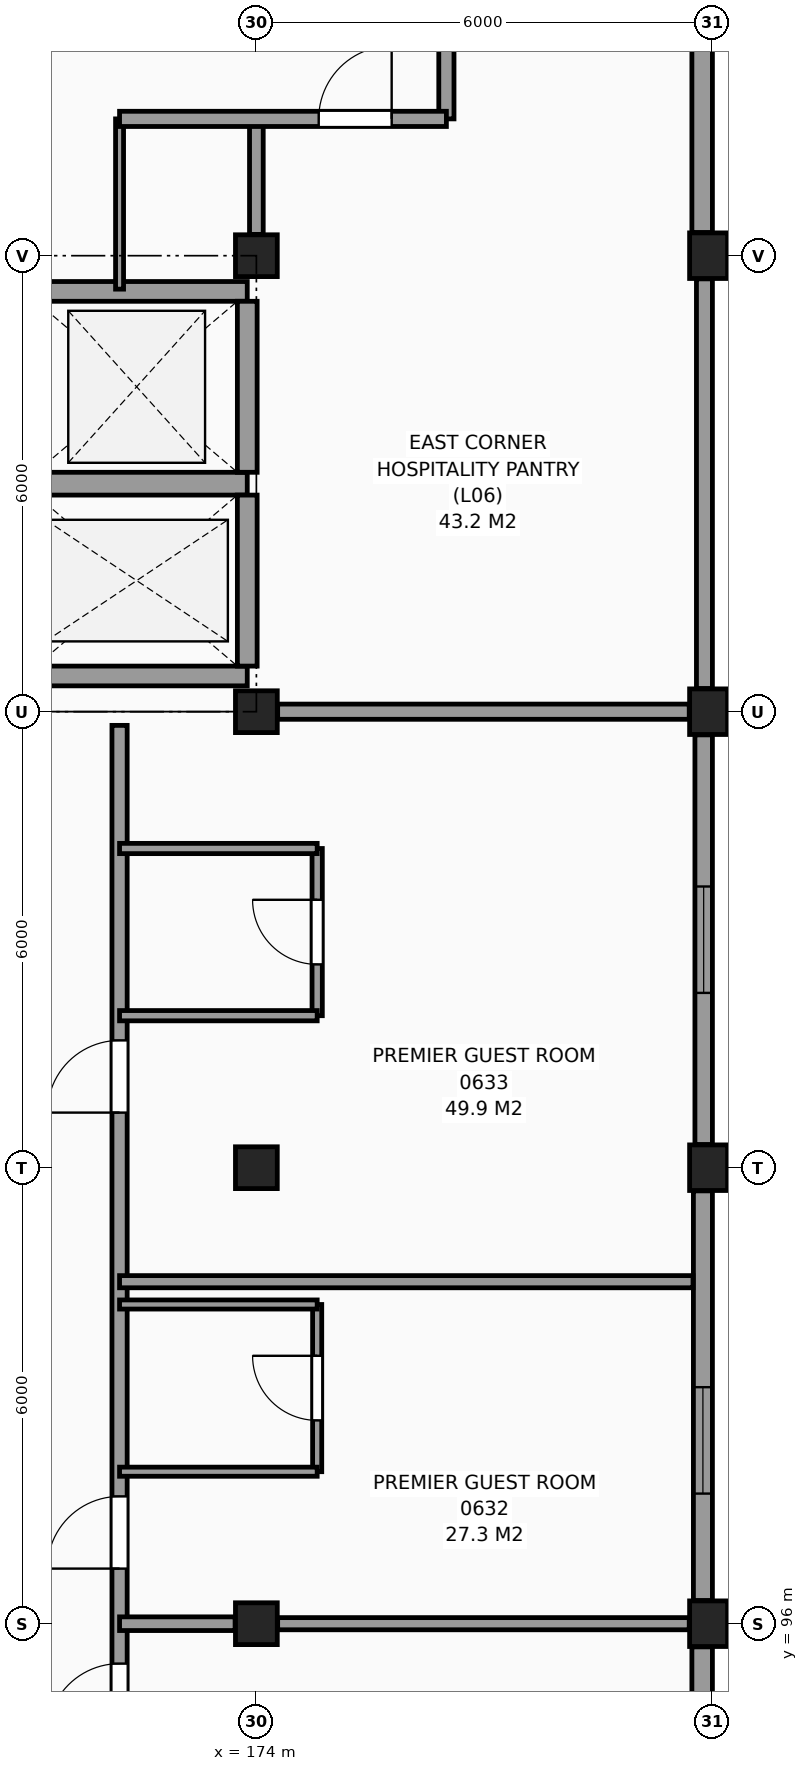
"""IFC4 building model, lengths in metres.
Left out: names, types, materials, properties, quantities, classifications, styles, units other than length and angle.
Written with IfcOpenShell. Run it as: python <this file> out.ifc"""

import sys

from ifc_helpers import new_model, si_unit, direction, frame, frame_2d, origin, origin_2d, place, context, subcontext, project, spatial, rectangle, extrude, element, fill, save


model = new_model("IFC4")
c1 = context("Model", 3, precision=1e-05, world=origin(), true_north=direction((0.0, 1.0)))
c2 = subcontext(c1, "Body", "Model", "MODEL_VIEW")
j1 = project(units=[si_unit("LENGTHUNIT", "METRE"), si_unit("PLANEANGLEUNIT", "RADIAN")], contexts=[c1])
p1 = place(None, origin())
s1 = spatial("IfcSite", under=j1, at=p1, CompositionType="ELEMENT")
p2 = place(p1, origin())
s2 = spatial("IfcBuilding", under=s1, at=p2, CompositionType="ELEMENT")
p3 = place(p2, frame((0.0, 0.0, 28.2)))
s3 = spatial("IfcBuildingStorey", under=s2, at=p3, CompositionType="ELEMENT", Elevation=28.2)
for number, where, z_axis, x_axis in (
    (1, (174.0, 96.0, 0.0), (0.0, 0.0, 1.0), (1.0, 0.0, 0.0)),
    (2, (174.0, 102.0, 0.0), (0.0, 0.0, 1.0), (1.0, 0.0, 0.0)),
    (3, (174.0, 108.0, 0.0), (0.0, 0.0, 1.0), (1.0, 0.0, 0.0)),
    (4, (174.0, 114.0, 0.0), (0.0, 0.0, 1.0), (1.0, 0.0, 0.0)),
):
    element("IfcColumn", number, at=place(p3, frame(where, z_axis=z_axis, x_axis=x_axis)), inside=s3, PredefinedType="COLUMN", context=c2, shape_type="SweptSolid", body=[
        extrude(rectangle(XDim=0.55, YDim=0.55, at=origin_2d()), origin(), (0.0, 0.0, 1.0), 3.3),
    ])
for number, where, z_axis, x_axis in (
    (5, (180.0, 96.0, 0.0), (0.0, 0.0, 1.0), (1.0, 0.0, 0.0)),
    (6, (180.0, 102.0, 0.0), (0.0, 0.0, 1.0), (1.0, 0.0, 0.0)),
    (7, (180.0, 108.0, 0.0), (0.0, 0.0, 1.0), (1.0, 0.0, 0.0)),
    (8, (180.0, 114.0, 0.0), (0.0, 0.0, 1.0), (1.0, 0.0, 0.0)),
):
    element("IfcColumn", number, at=place(p3, frame(where, z_axis=z_axis, x_axis=x_axis)), inside=s3, PredefinedType="COLUMN", context=c2, shape_type="SweptSolid", body=[
        extrude(rectangle(XDim=0.6, YDim=0.6, at=origin_2d()), origin(), (0.0, 0.0, 1.0), 3.3),
    ])
p4 = place(p3, frame((179.865, 90.305, 0.0), z_axis=(0.0, 0.0, 1.0), x_axis=(0.0, 1.0, 0.0)))
e9 = element("IfcWall", 9, at=p4, inside=s3, PredefinedType="SOLIDWALL", context=c2, shape_type="SweptSolid", body=[
    extrude(rectangle(XDim=5.39, YDim=0.27, at=frame_2d((2.695, 0.0))), origin(), (0.0, 0.0, 1.0), 2.43),
])
p5 = place(p4, frame((2.582, 0.0, 0.8)))
e10 = element("IfcOpeningElement", 10, at=p5, cuts=e9, PredefinedType="OPENING", context=c2, shape_type="SweptSolid", body=[
    extrude(rectangle(XDim=1.4, YDim=1.4, at=frame_2d((0.7, 0.7))), frame((0.0, 0.145, 0.0), z_axis=(0.0, -1.0, 0.0), x_axis=(1.0, 0.0, 0.0)), (0.0, 0.0, 1.0), 0.29),
])
p6 = place(p3, frame((179.875, 96.305, 0.0), z_axis=(0.0, 0.0, 1.0), x_axis=(0.0, 1.0, 0.0)))
e11 = element("IfcWall", 11, at=p6, inside=s3, PredefinedType="SOLIDWALL", context=c2, shape_type="SweptSolid", body=[
    extrude(rectangle(XDim=5.39, YDim=0.25, at=frame_2d((2.695, 0.0))), origin(), (0.0, 0.0, 1.0), 2.43),
])
p7 = place(p6, frame((1.407, 0.0, 0.8)))
e12 = element("IfcOpeningElement", 12, at=p7, cuts=e11, PredefinedType="OPENING", context=c2, shape_type="SweptSolid", body=[
    extrude(rectangle(XDim=1.4, YDim=1.4, at=frame_2d((0.7, 0.7))), frame((0.0, 0.135, 0.0), z_axis=(0.0, -1.0, 0.0), x_axis=(1.0, 0.0, 0.0)), (0.0, 0.0, 1.0), 0.27),
])
p8 = place(p3, frame((179.885, 102.305, 0.0), z_axis=(0.0, 0.0, 1.0), x_axis=(0.0, 1.0, 0.0)))
e13 = element("IfcWall", 13, at=p8, inside=s3, PredefinedType="SOLIDWALL", context=c2, shape_type="SweptSolid", body=[
    extrude(rectangle(XDim=5.39, YDim=0.23, at=frame_2d((2.695, 0.0))), origin(), (0.0, 0.0, 1.0), 2.43),
])
p9 = place(p8, frame((1.995, 0.0, 0.8)))
e14 = element("IfcOpeningElement", 14, at=p9, cuts=e13, PredefinedType="OPENING", context=c2, shape_type="SweptSolid", body=[
    extrude(rectangle(XDim=1.4, YDim=1.4, at=frame_2d((0.7, 0.7))), frame((0.0, 0.125, 0.0), z_axis=(0.0, -1.0, 0.0), x_axis=(1.0, 0.0, 0.0)), (0.0, 0.0, 1.0), 0.25),
])
p10 = place(p3, frame((179.895, 108.305, 0.0), z_axis=(0.0, 0.0, 1.0), x_axis=(0.0, 1.0, 0.0)))
e15 = element("IfcWall", 15, at=p10, inside=s3, PredefinedType="SOLIDWALL", context=c2, shape_type="SweptSolid", body=[
    extrude(rectangle(XDim=5.39, YDim=0.21, at=frame_2d((2.695, 0.0))), origin(), (0.0, 0.0, 1.0), 2.43),
])
p11 = place(p3, frame((179.865, 114.305, 0.0), z_axis=(0.0, 0.0, 1.0), x_axis=(0.0, 1.0, 0.0)))
e16 = element("IfcWall", 16, at=p11, inside=s3, PredefinedType="SOLIDWALL", context=c2, shape_type="SweptSolid", body=[
    extrude(rectangle(XDim=5.39, YDim=0.27, at=frame_2d((2.695, 0.0))), origin(), (0.0, 0.0, 1.0), 2.43),
])
p12 = place(p3, frame((170.97, 108.47, 0.0), z_axis=(0.0, 0.0, 1.0), x_axis=(1.0, 0.0, 0.0)))
e17 = element("IfcWall", 17, at=p12, inside=s3, PredefinedType="SHEAR", context=c2, shape_type="SweptSolid", body=[
    extrude(rectangle(XDim=2.91, YDim=0.26, at=frame_2d((1.455, 0.0))), origin(), (0.0, 0.0, 1.0), 3.3),
])
p13 = place(p3, frame((170.97, 111.0, 0.0), z_axis=(0.0, 0.0, 1.0), x_axis=(1.0, 0.0, 0.0)))
e18 = element("IfcWall", 18, at=p13, inside=s3, PredefinedType="SHEAR", context=c2, shape_type="SweptSolid", body=[
    extrude(rectangle(XDim=2.91, YDim=0.3, at=frame_2d((1.455, 0.0))), origin(), (0.0, 0.0, 1.0), 3.3),
])
p14 = place(p3, frame((173.88, 108.6, 0.0), z_axis=(0.0, 0.0, 1.0), x_axis=(0.0, 1.0, 0.0)))
e19 = element("IfcWall", 19, at=p14, inside=s3, PredefinedType="SHEAR", context=c2, shape_type="SweptSolid", body=[
    extrude(rectangle(XDim=2.25, YDim=0.26, at=frame_2d((1.125, 0.0))), origin(), (0.0, 0.0, 1.0), 3.3),
])
p15 = place(p3, frame((170.97, 113.53, 0.0), z_axis=(0.0, 0.0, 1.0), x_axis=(1.0, 0.0, 0.0)))
e20 = element("IfcWall", 20, at=p15, inside=s3, PredefinedType="SHEAR", context=c2, shape_type="SweptSolid", body=[
    extrude(rectangle(XDim=2.91, YDim=0.26, at=frame_2d((1.455, 0.0))), origin(), (0.0, 0.0, 1.0), 3.3),
])
p16 = place(p3, frame((173.88, 111.15, 0.0), z_axis=(0.0, 0.0, 1.0), x_axis=(0.0, 1.0, 0.0)))
e21 = element("IfcWall", 21, at=p16, inside=s3, PredefinedType="SHEAR", context=c2, shape_type="SweptSolid", body=[
    extrude(rectangle(XDim=2.25, YDim=0.26, at=frame_2d((1.125, 0.0))), origin(), (0.0, 0.0, 1.0), 3.3),
])
p17 = place(p3, frame((172.2, 42.275, 0.0), z_axis=(0.0, 0.0, 1.0), x_axis=(0.0, 1.0, 0.0)))
e22 = element("IfcWall", 22, at=p17, inside=s3, PredefinedType="PARTITIONING", context=c2, shape_type="SweptSolid", body=[
    extrude(rectangle(XDim=65.545, YDim=0.2, at=frame_2d((32.772, 0.0))), origin(), (0.0, 0.0, 1.0), 3.08),
])
p18 = place(p17, frame((0.4, 0.0, 0.0)))
e23 = element("IfcOpeningElement", 23, at=p18, cuts=e22, PredefinedType="OPENING", context=c2, shape_type="SweptSolid", body=[
    extrude(rectangle(XDim=0.95, YDim=2.1, at=frame_2d((0.475, 1.05))), frame((0.0, 0.11, 0.0), z_axis=(0.0, -1.0, 0.0), x_axis=(1.0, 0.0, 0.0)), (0.0, 0.0, 1.0), 0.22),
])
p19 = place(p17, frame((4.85, 0.0, 0.0)))
e24 = element("IfcOpeningElement", 24, at=p19, cuts=e22, PredefinedType="OPENING", context=c2, shape_type="SweptSolid", body=[
    extrude(rectangle(XDim=0.95, YDim=2.1, at=frame_2d((0.475, 1.05))), frame((0.0, 0.11, 0.0), z_axis=(0.0, -1.0, 0.0), x_axis=(1.0, 0.0, 0.0)), (0.0, 0.0, 1.0), 0.22),
])
p20 = place(p17, frame((9.35, 0.0, 0.0)))
e25 = element("IfcOpeningElement", 25, at=p20, cuts=e22, PredefinedType="OPENING", context=c2, shape_type="SweptSolid", body=[
    extrude(rectangle(XDim=0.95, YDim=2.1, at=frame_2d((0.475, 1.05))), frame((0.0, 0.11, 0.0), z_axis=(0.0, -1.0, 0.0), x_axis=(1.0, 0.0, 0.0)), (0.0, 0.0, 1.0), 0.22),
])
p21 = place(p17, frame((18.45, 0.0, 0.0)))
e26 = element("IfcOpeningElement", 26, at=p21, cuts=e22, PredefinedType="OPENING", context=c2, shape_type="SweptSolid", body=[
    extrude(rectangle(XDim=0.95, YDim=2.1, at=frame_2d((0.475, 1.05))), frame((0.0, 0.11, 0.0), z_axis=(0.0, -1.0, 0.0), x_axis=(1.0, 0.0, 0.0)), (0.0, 0.0, 1.0), 0.22),
])
p22 = place(p17, frame((22.85, 0.0, 0.0)))
e27 = element("IfcOpeningElement", 27, at=p22, cuts=e22, PredefinedType="OPENING", context=c2, shape_type="SweptSolid", body=[
    extrude(rectangle(XDim=0.95, YDim=2.1, at=frame_2d((0.475, 1.05))), frame((0.0, 0.11, 0.0), z_axis=(0.0, -1.0, 0.0), x_axis=(1.0, 0.0, 0.0)), (0.0, 0.0, 1.0), 0.22),
])
p23 = place(p17, frame((30.05, 0.0, 0.0)))
e28 = element("IfcOpeningElement", 28, at=p23, cuts=e22, PredefinedType="OPENING", context=c2, shape_type="SweptSolid", body=[
    extrude(rectangle(XDim=0.95, YDim=2.1, at=frame_2d((0.475, 1.05))), frame((0.0, 0.11, 0.0), z_axis=(0.0, -1.0, 0.0), x_axis=(1.0, 0.0, 0.0)), (0.0, 0.0, 1.0), 0.22),
])
p24 = place(p17, frame((38.3, 0.0, 0.0)))
e29 = element("IfcOpeningElement", 29, at=p24, cuts=e22, PredefinedType="OPENING", context=c2, shape_type="SweptSolid", body=[
    extrude(rectangle(XDim=0.95, YDim=2.1, at=frame_2d((0.475, 1.05))), frame((0.0, 0.11, 0.0), z_axis=(0.0, -1.0, 0.0), x_axis=(1.0, 0.0, 0.0)), (0.0, 0.0, 1.0), 0.22),
])
p25 = place(p17, frame((40.85, 0.0, 0.0)))
e30 = element("IfcOpeningElement", 30, at=p25, cuts=e22, PredefinedType="OPENING", context=c2, shape_type="SweptSolid", body=[
    extrude(rectangle(XDim=0.95, YDim=2.1, at=frame_2d((0.475, 1.05))), frame((0.0, 0.11, 0.0), z_axis=(0.0, -1.0, 0.0), x_axis=(1.0, 0.0, 0.0)), (0.0, 0.0, 1.0), 0.22),
])
p26 = place(p17, frame((48.05, 0.0, 0.0)))
e31 = element("IfcOpeningElement", 31, at=p26, cuts=e22, PredefinedType="OPENING", context=c2, shape_type="SweptSolid", body=[
    extrude(rectangle(XDim=0.95, YDim=2.1, at=frame_2d((0.475, 1.05))), frame((0.0, 0.11, 0.0), z_axis=(0.0, -1.0, 0.0), x_axis=(1.0, 0.0, 0.0)), (0.0, 0.0, 1.0), 0.22),
])
p27 = place(p17, frame((52.25, 0.0, 0.0)))
e32 = element("IfcOpeningElement", 32, at=p27, cuts=e22, PredefinedType="OPENING", context=c2, shape_type="SweptSolid", body=[
    extrude(rectangle(XDim=0.95, YDim=2.1, at=frame_2d((0.475, 1.05))), frame((0.0, 0.11, 0.0), z_axis=(0.0, -1.0, 0.0), x_axis=(1.0, 0.0, 0.0)), (0.0, 0.0, 1.0), 0.22),
])
p28 = place(p17, frame((54.45, 0.0, 0.0)))
e33 = element("IfcOpeningElement", 33, at=p28, cuts=e22, PredefinedType="OPENING", context=c2, shape_type="SweptSolid", body=[
    extrude(rectangle(XDim=0.95, YDim=2.1, at=frame_2d((0.475, 1.05))), frame((0.0, 0.11, 0.0), z_axis=(0.0, -1.0, 0.0), x_axis=(1.0, 0.0, 0.0)), (0.0, 0.0, 1.0), 0.22),
])
p29 = place(p17, frame((60.45, 0.0, 0.0)))
e34 = element("IfcOpeningElement", 34, at=p29, cuts=e22, PredefinedType="OPENING", context=c2, shape_type="SweptSolid", body=[
    extrude(rectangle(XDim=0.95, YDim=2.1, at=frame_2d((0.475, 1.05))), frame((0.0, 0.11, 0.0), z_axis=(0.0, -1.0, 0.0), x_axis=(1.0, 0.0, 0.0)), (0.0, 0.0, 1.0), 0.22),
])
p30 = place(p3, frame((172.2, 113.56, 0.0), z_axis=(0.0, 0.0, 1.0), x_axis=(0.0, 1.0, 0.0)))
e35 = element("IfcWall", 35, at=p30, inside=s3, PredefinedType="PARTITIONING", context=c2, shape_type="SweptSolid", body=[
    extrude(rectangle(XDim=2.24, YDim=0.105, at=frame_2d((1.12, 0.0))), origin(), (0.0, 0.0, 1.0), 3.08),
])
p31 = place(p3, frame((174.0, 114.28, 0.0), z_axis=(0.0, 0.0, 1.0), x_axis=(0.0, 1.0, 0.0)))
e36 = element("IfcWall", 36, at=p31, inside=s3, PredefinedType="PARTITIONING", context=c2, shape_type="SweptSolid", body=[
    extrude(rectangle(XDim=1.52, YDim=0.18, at=frame_2d((0.76, 0.0))), origin(), (0.0, 0.0, 1.0), 2.38),
])
p32 = place(p3, frame((174.8, 98.0, 0.0), z_axis=(0.0, 0.0, 1.0), x_axis=(0.0, 1.0, 0.0)))
e37 = element("IfcWall", 37, at=p32, inside=s3, PredefinedType="PARTITIONING", context=c2, shape_type="SweptSolid", body=[
    extrude(rectangle(XDim=2.2, YDim=0.12, at=frame_2d((1.1, 0.0))), origin(), (0.0, 0.0, 1.0), 3.08),
])
p33 = place(p32, frame((0.675, 0.0, 0.0)))
e38 = element("IfcOpeningElement", 38, at=p33, cuts=e37, PredefinedType="OPENING", context=c2, shape_type="SweptSolid", body=[
    extrude(rectangle(XDim=0.85, YDim=2.1, at=frame_2d((0.425, 1.05))), frame((0.0, 0.07, 0.0), z_axis=(0.0, -1.0, 0.0), x_axis=(1.0, 0.0, 0.0)), (0.0, 0.0, 1.0), 0.14),
])
p34 = place(p3, frame((174.8, 104.0, 0.0), z_axis=(0.0, 0.0, 1.0), x_axis=(0.0, 1.0, 0.0)))
e39 = element("IfcWall", 39, at=p34, inside=s3, PredefinedType="PARTITIONING", context=c2, shape_type="SweptSolid", body=[
    extrude(rectangle(XDim=2.2, YDim=0.135, at=frame_2d((1.1, 0.0))), origin(), (0.0, 0.0, 1.0), 3.08),
])
p35 = place(p34, frame((0.675, 0.0, 0.0)))
e40 = element("IfcOpeningElement", 40, at=p35, cuts=e39, PredefinedType="OPENING", context=c2, shape_type="SweptSolid", body=[
    extrude(rectangle(XDim=0.85, YDim=2.1, at=frame_2d((0.425, 1.05))), frame((0.0, 0.078, 0.0), z_axis=(0.0, -1.0, 0.0), x_axis=(1.0, 0.0, 0.0)), (0.0, 0.0, 1.0), 0.155),
])
p36 = place(p3, frame((176.5, 115.8, 0.0), z_axis=(0.0, 0.0, 1.0), x_axis=(0.0, 1.0, 0.0)))
e41 = element("IfcWall", 41, at=p36, inside=s3, PredefinedType="PARTITIONING", context=c2, shape_type="SweptSolid", body=[
    extrude(rectangle(XDim=2.4, YDim=0.2, at=frame_2d((1.2, 0.0))), origin(), (0.0, 0.0, 1.0), 3.08),
])
p37 = place(p3, frame((172.2, 96.0, 0.0), z_axis=(0.0, 0.0, 1.0), x_axis=(1.0, 0.0, 0.0)))
e42 = element("IfcWall", 42, at=p37, inside=s3, PredefinedType="PARTITIONING", context=c2, shape_type="SweptSolid", body=[
    extrude(rectangle(XDim=1.52, YDim=0.18, at=frame_2d((0.76, 0.0))), origin(), (0.0, 0.0, 1.0), 2.28),
])
p38 = place(p3, frame((174.28, 96.0, 0.0), z_axis=(0.0, 0.0, 1.0), x_axis=(1.0, 0.0, 0.0)))
e43 = element("IfcWall", 43, at=p38, inside=s3, PredefinedType="PARTITIONING", context=c2, shape_type="SweptSolid", body=[
    extrude(rectangle(XDim=5.415, YDim=0.16, at=frame_2d((2.708, 0.0))), origin(), (0.0, 0.0, 1.0), 2.38),
])
for number, where, z_axis, x_axis in (
    (44, (172.2, 98.0, 0.0), (0.0, 0.0, 1.0), (1.0, 0.0, 0.0)),
    (45, (172.2, 100.2, 0.0), (0.0, 0.0, 1.0), (1.0, 0.0, 0.0)),
):
    element("IfcWall", number, at=place(p3, frame(where, z_axis=z_axis, x_axis=x_axis)), inside=s3, PredefinedType="PARTITIONING", context=c2, shape_type="SweptSolid", body=[
        extrude(rectangle(XDim=2.6, YDim=0.12, at=frame_2d((1.3, 0.0))), origin(), (0.0, 0.0, 1.0), 3.08),
    ])
p39 = place(p3, frame((172.2, 100.5, 0.0), z_axis=(0.0, 0.0, 1.0), x_axis=(1.0, 0.0, 0.0)))
e46 = element("IfcWall", 46, at=p39, inside=s3, PredefinedType="PARTITIONING", context=c2, shape_type="SweptSolid", body=[
    extrude(rectangle(XDim=7.545, YDim=0.16, at=frame_2d((3.772, 0.0))), origin(), (0.0, 0.0, 1.0), 3.08),
])
for number, where, z_axis, x_axis in (
    (47, (172.2, 104.0, 0.0), (0.0, 0.0, 1.0), (1.0, 0.0, 0.0)),
    (48, (172.2, 106.2, 0.0), (0.0, 0.0, 1.0), (1.0, 0.0, 0.0)),
):
    element("IfcWall", number, at=place(p3, frame(where, z_axis=z_axis, x_axis=x_axis)), inside=s3, PredefinedType="PARTITIONING", context=c2, shape_type="SweptSolid", body=[
        extrude(rectangle(XDim=2.6, YDim=0.135, at=frame_2d((1.3, 0.0))), origin(), (0.0, 0.0, 1.0), 3.08),
    ])
p40 = place(p3, frame((174.28, 108.0, 0.0), z_axis=(0.0, 0.0, 1.0), x_axis=(1.0, 0.0, 0.0)))
e49 = element("IfcWall", 49, at=p40, inside=s3, PredefinedType="PARTITIONING", context=c2, shape_type="SweptSolid", body=[
    extrude(rectangle(XDim=5.415, YDim=0.2, at=frame_2d((2.708, 0.0))), origin(), (0.0, 0.0, 1.0), 2.38),
])
p41 = place(p3, frame((172.2, 115.8, 0.0), z_axis=(0.0, 0.0, 1.0), x_axis=(1.0, 0.0, 0.0)))
e50 = element("IfcWall", 50, at=p41, inside=s3, PredefinedType="PARTITIONING", context=c2, shape_type="SweptSolid", body=[
    extrude(rectangle(XDim=4.3, YDim=0.2, at=frame_2d((2.15, 0.0))), origin(), (0.0, 0.0, 1.0), 3.08),
])
p42 = place(p41, frame((2.62, 0.0, 0.0)))
e51 = element("IfcOpeningElement", 51, at=p42, cuts=e50, PredefinedType="OPENING", context=c2, shape_type="SweptSolid", body=[
    extrude(rectangle(XDim=0.96, YDim=2.15, at=frame_2d((0.48, 1.075))), frame((0.0, 0.11, 0.0), z_axis=(0.0, -1.0, 0.0), x_axis=(1.0, 0.0, 0.0)), (0.0, 0.0, 1.0), 0.22),
])
p43 = place(p7, origin())
e52 = element("IfcWindow", 52, at=p43, inside=s3, PartitioningType="SINGLE_PANEL", PredefinedType="WINDOW", context=c2, shape_type="SweptSolid", body=[
    extrude(rectangle(XDim=1.4, YDim=1.4, at=frame_2d((0.7, 0.7))), frame((0.0, 0.03, 0.0), z_axis=(0.0, -1.0, 0.0), x_axis=(1.0, 0.0, 0.0)), (0.0, 0.0, 1.0), 0.06),
])
fill(e12, e52)
p44 = place(p9, origin())
e53 = element("IfcWindow", 53, at=p44, inside=s3, PartitioningType="SINGLE_PANEL", PredefinedType="WINDOW", context=c2, shape_type="SweptSolid", body=[
    extrude(rectangle(XDim=1.4, YDim=1.4, at=frame_2d((0.7, 0.7))), frame((0.0, 0.03, 0.0), z_axis=(0.0, -1.0, 0.0), x_axis=(1.0, 0.0, 0.0)), (0.0, 0.0, 1.0), 0.06),
])
fill(e14, e53)
p45 = place(p27, origin())
e54 = element("IfcDoor", 54, at=p45, inside=s3, OperationType="SINGLE_SWING_LEFT", PredefinedType="DOOR", context=c2, shape_type="SweptSolid", body=[
    extrude(rectangle(XDim=0.95, YDim=2.1, at=frame_2d((0.475, 1.05))), frame((0.0, 0.025, 0.0), z_axis=(0.0, -1.0, 0.0), x_axis=(1.0, 0.0, 0.0)), (0.0, 0.0, 1.0), 0.05),
])
fill(e32, e54)
p46 = place(p33, origin())
e55 = element("IfcDoor", 55, at=p46, inside=s3, OperationType="SINGLE_SWING_RIGHT", PredefinedType="DOOR", context=c2, shape_type="SweptSolid", body=[
    extrude(rectangle(XDim=0.85, YDim=2.1, at=frame_2d((0.425, 1.05))), frame((0.0, 0.025, 0.0), z_axis=(0.0, -1.0, 0.0), x_axis=(1.0, 0.0, 0.0)), (0.0, 0.0, 1.0), 0.05),
])
fill(e38, e55)
p47 = place(p28, origin())
e56 = element("IfcDoor", 56, at=p47, inside=s3, OperationType="SINGLE_SWING_LEFT", PredefinedType="DOOR", context=c2, shape_type="SweptSolid", body=[
    extrude(rectangle(XDim=0.95, YDim=2.1, at=frame_2d((0.475, 1.05))), frame((0.0, 0.025, 0.0), z_axis=(0.0, -1.0, 0.0), x_axis=(1.0, 0.0, 0.0)), (0.0, 0.0, 1.0), 0.05),
])
fill(e33, e56)
p48 = place(p35, origin())
e57 = element("IfcDoor", 57, at=p48, inside=s3, OperationType="SINGLE_SWING_RIGHT", PredefinedType="DOOR", context=c2, shape_type="SweptSolid", body=[
    extrude(rectangle(XDim=0.85, YDim=2.1, at=frame_2d((0.425, 1.05))), frame((0.0, 0.025, 0.0), z_axis=(0.0, -1.0, 0.0), x_axis=(1.0, 0.0, 0.0)), (0.0, 0.0, 1.0), 0.05),
])
fill(e40, e57)
p49 = place(p29, origin())
e58 = element("IfcDoor", 58, at=p49, inside=s3, OperationType="SINGLE_SWING_LEFT", PredefinedType="DOOR", context=c2, shape_type="SweptSolid", body=[
    extrude(rectangle(XDim=0.95, YDim=2.1, at=frame_2d((0.475, 1.05))), frame((0.0, 0.025, 0.0), z_axis=(0.0, -1.0, 0.0), x_axis=(1.0, 0.0, 0.0)), (0.0, 0.0, 1.0), 0.05),
])
fill(e34, e58)
p50 = place(p42, origin())
e59 = element("IfcDoor", 59, at=p50, inside=s3, OperationType="SINGLE_SWING_RIGHT", PredefinedType="DOOR", context=c2, shape_type="SweptSolid", body=[
    extrude(rectangle(XDim=0.96, YDim=2.15, at=frame_2d((0.48, 1.075))), frame((0.0, 0.025, 0.0), z_axis=(0.0, -1.0, 0.0), x_axis=(1.0, 0.0, 0.0)), (0.0, 0.0, 1.0), 0.05),
])
fill(e51, e59)
save(model, sys.argv[1])
